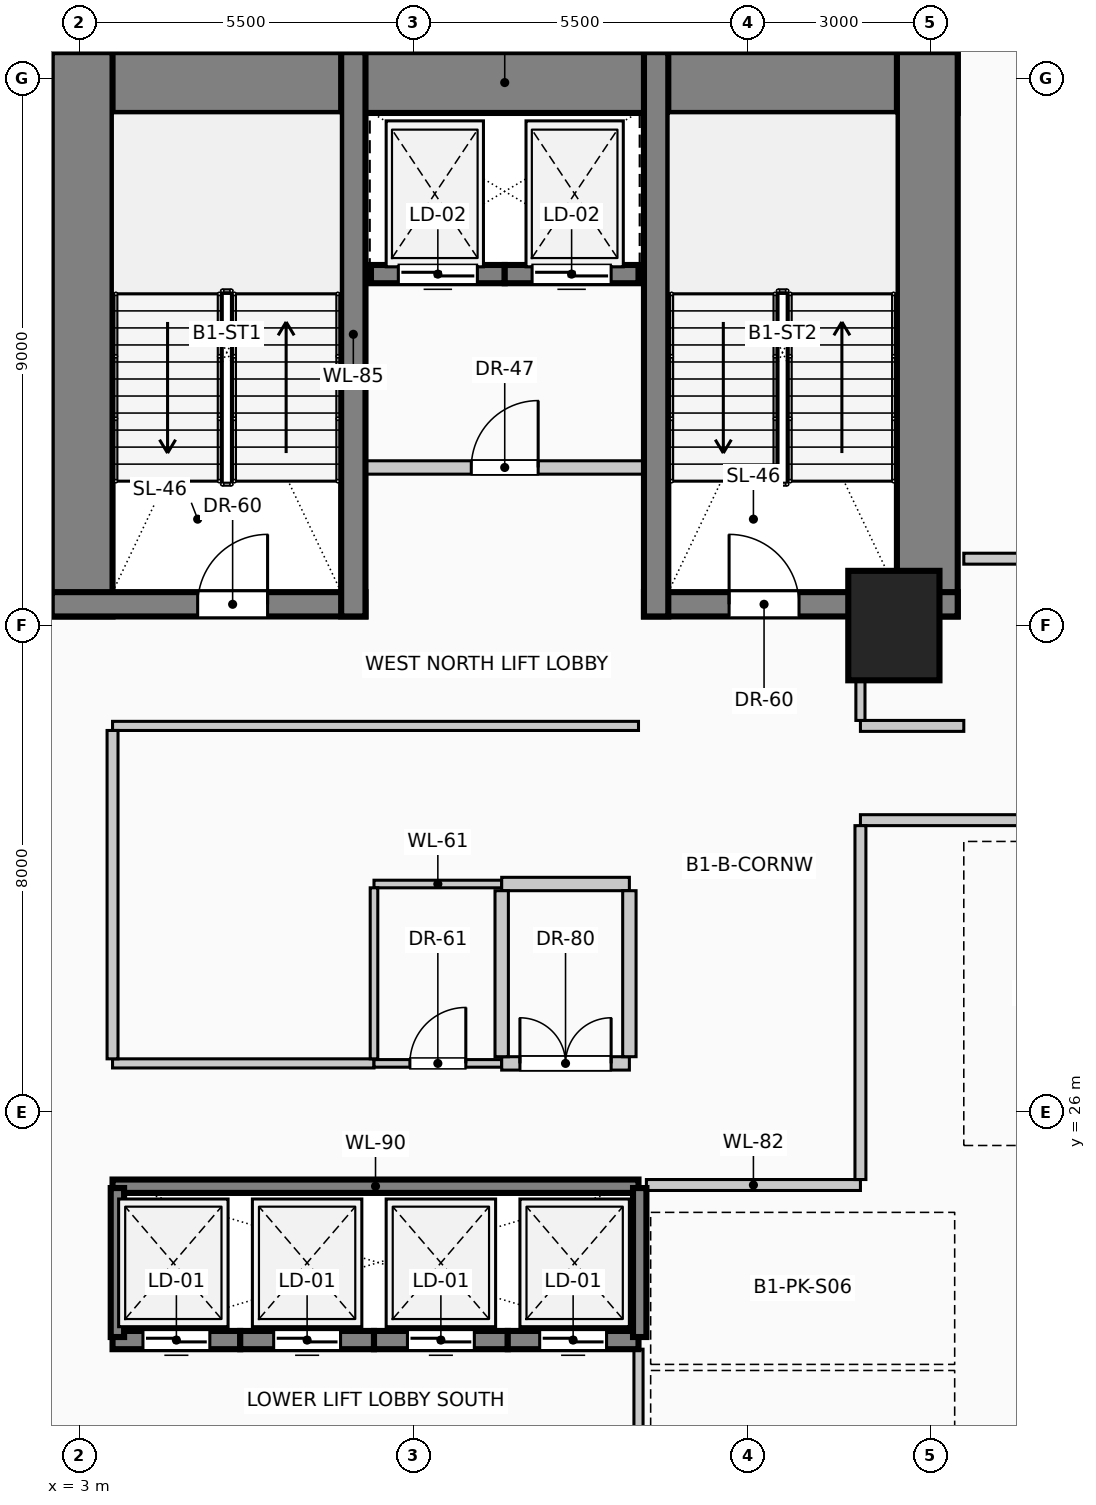
"""IFC4 building model, lengths in metres.
Left out: names, types, materials, properties, quantities, classifications, styles, units other than length and angle.
Written with IfcOpenShell. Run it as: python <this file> out.ifc"""

import sys

from ifc_helpers import new_model, si_unit, direction, frame, frame_2d, origin, origin_2d, place, context, subcontext, project, spatial, rectangle, extrude, element, fill, save


model = new_model("IFC4")
c1 = context("Model", 3, precision=1e-05, world=origin(), true_north=direction((0.0, 1.0)))
c2 = subcontext(c1, "Body", "Model", "MODEL_VIEW")
j1 = project(units=[si_unit("LENGTHUNIT", "METRE"), si_unit("PLANEANGLEUNIT", "RADIAN")], contexts=[c1])
p1 = place(None, origin())
s1 = spatial("IfcSite", under=j1, at=p1, CompositionType="ELEMENT")
p2 = place(p1, origin())
s2 = spatial("IfcBuilding", under=s1, at=p2, CompositionType="ELEMENT")
p3 = place(p2, frame((0.0, 0.0, -4.5)))
s3 = spatial("IfcBuildingStorey", under=s2, at=p3, CompositionType="ELEMENT", Elevation=-4.5)
p4 = place(p3, frame((2.55, 42.93, 0.0), z_axis=(0.0, 0.0, 1.0), x_axis=(1.0, 0.0, 0.0)))
e1 = element("IfcWall", 1, at=p4, inside=s3, PredefinedType="SHEAR", context=c2, shape_type="SweptSolid", body=[
    extrude(rectangle(XDim=14.9, YDim=1.0, at=frame_2d((7.45, 0.0))), origin(), (0.0, 0.0, 1.0), 4.5),
])
for number, where, z_axis, x_axis in (
    (2, (3.05, 34.15, 0.0), (0.0, 0.0, 1.0), (0.0, 1.0, 0.0)),
    (3, (16.95, 34.15, 0.0), (0.0, 0.0, 1.0), (0.0, 1.0, 0.0)),
):
    element("IfcWall", number, at=place(p3, frame(where, z_axis=z_axis, x_axis=x_axis)), inside=s3, PredefinedType="SHEAR", context=c2, shape_type="SweptSolid", body=[
        extrude(rectangle(XDim=9.28, YDim=1.0, at=frame_2d((4.64, 0.0))), origin(), (0.0, 0.0, 1.0), 4.5),
    ])
p5 = place(p3, frame((2.55, 34.35, 0.0), z_axis=(0.0, 0.0, 1.0), x_axis=(1.0, 0.0, 0.0)))
e4 = element("IfcWall", 4, at=p5, inside=s3, PredefinedType="SHEAR", context=c2, shape_type="SweptSolid", body=[
    extrude(rectangle(XDim=5.16, YDim=0.4, at=frame_2d((2.58, 0.0))), origin(), (0.0, 0.0, 1.0), 4.5),
])
p6 = place(p5, frame((2.4, 0.0, 0.0)))
e5 = element("IfcOpeningElement", 5, at=p6, cuts=e4, PredefinedType="OPENING", context=c2, shape_type="SweptSolid", body=[
    extrude(rectangle(XDim=1.15, YDim=2.2, at=frame_2d((0.575, 1.1))), frame((0.0, 0.21, 0.0), z_axis=(0.0, -1.0, 0.0), x_axis=(1.0, 0.0, 0.0)), (0.0, 0.0, 1.0), 0.42),
])
p7 = place(p3, frame((12.29, 34.35, 0.0), z_axis=(0.0, 0.0, 1.0), x_axis=(1.0, 0.0, 0.0)))
e6 = element("IfcWall", 6, at=p7, inside=s3, PredefinedType="SHEAR", context=c2, shape_type="SweptSolid", body=[
    extrude(rectangle(XDim=5.16, YDim=0.4, at=frame_2d((2.58, 0.0))), origin(), (0.0, 0.0, 1.0), 4.5),
])
p8 = place(p7, frame((1.4, 0.0, 0.0)))
e7 = element("IfcOpeningElement", 7, at=p8, cuts=e6, PredefinedType="OPENING", context=c2, shape_type="SweptSolid", body=[
    extrude(rectangle(XDim=1.15, YDim=2.2, at=frame_2d((0.575, 1.1))), frame((0.0, 0.21, 0.0), z_axis=(0.0, -1.0, 0.0), x_axis=(1.0, 0.0, 0.0)), (0.0, 0.0, 1.0), 0.42),
])
for number, where, z_axis, x_axis in (
    (8, (7.51, 34.15, 0.0), (0.0, 0.0, 1.0), (0.0, 1.0, 0.0)),
    (9, (12.49, 34.15, 0.0), (0.0, 0.0, 1.0), (0.0, 1.0, 0.0)),
):
    element("IfcWall", number, at=place(p3, frame(where, z_axis=z_axis, x_axis=x_axis)), inside=s3, PredefinedType="SHEAR", context=c2, shape_type="SweptSolid", body=[
        extrude(rectangle(XDim=9.28, YDim=0.4, at=frame_2d((4.64, 0.0))), origin(), (0.0, 0.0, 1.0), 4.5),
    ])
p9 = place(p3, frame((16.4, 34.0, 0.0), z_axis=(0.0, 0.0, 1.0), x_axis=(1.0, 0.0, 0.0)))
e10 = element("IfcColumn", 10, at=p9, inside=s3, PredefinedType="COLUMN", context=c2, shape_type="SweptSolid", body=[
    extrude(rectangle(XDim=1.5, YDim=1.8, at=origin_2d()), origin(), (0.0, 0.0, 1.0), 4.5),
])
p10 = place(p3, frame((5.65, 22.25, 0.0), z_axis=(0.0, 0.0, 1.0), x_axis=(-1.0, 0.0, 0.0)))
e11 = element("IfcWall", 11, at=p10, inside=s3, PredefinedType="SOLIDWALL", context=c2, shape_type="SweptSolid", body=[
    extrude(rectangle(XDim=2.1, YDim=0.3, at=frame_2d((1.05, 0.0))), origin(), (0.0, 0.0, 1.0), 4.5),
])
p11 = place(p10, frame((0.5, 0.0, 0.0)))
e12 = element("IfcOpeningElement", 12, at=p11, cuts=e11, PredefinedType="OPENING", context=c2, shape_type="SweptSolid", body=[
    extrude(rectangle(XDim=1.1, YDim=2.2, at=frame_2d((0.55, 1.1))), frame((0.0, 0.16, 0.0), z_axis=(0.0, -1.0, 0.0), x_axis=(1.0, 0.0, 0.0)), (0.0, 0.0, 1.0), 0.32),
])
p12 = place(p3, frame((7.85, 22.25, 0.0), z_axis=(0.0, 0.0, 1.0), x_axis=(-1.0, 0.0, 0.0)))
e13 = element("IfcWall", 13, at=p12, inside=s3, PredefinedType="SOLIDWALL", context=c2, shape_type="SweptSolid", body=[
    extrude(rectangle(XDim=2.2, YDim=0.3, at=frame_2d((1.1, 0.0))), origin(), (0.0, 0.0, 1.0), 4.5),
])
p13 = place(p12, frame((0.55, 0.0, 0.0)))
e14 = element("IfcOpeningElement", 14, at=p13, cuts=e13, PredefinedType="OPENING", context=c2, shape_type="SweptSolid", body=[
    extrude(rectangle(XDim=1.1, YDim=2.2, at=frame_2d((0.55, 1.1))), frame((0.0, 0.16, 0.0), z_axis=(0.0, -1.0, 0.0), x_axis=(1.0, 0.0, 0.0)), (0.0, 0.0, 1.0), 0.32),
])
p14 = place(p3, frame((10.05, 22.25, 0.0), z_axis=(0.0, 0.0, 1.0), x_axis=(-1.0, 0.0, 0.0)))
e15 = element("IfcWall", 15, at=p14, inside=s3, PredefinedType="SOLIDWALL", context=c2, shape_type="SweptSolid", body=[
    extrude(rectangle(XDim=2.2, YDim=0.3, at=frame_2d((1.1, 0.0))), origin(), (0.0, 0.0, 1.0), 4.5),
])
p15 = place(p14, frame((0.55, 0.0, 0.0)))
e16 = element("IfcOpeningElement", 16, at=p15, cuts=e15, PredefinedType="OPENING", context=c2, shape_type="SweptSolid", body=[
    extrude(rectangle(XDim=1.1, YDim=2.2, at=frame_2d((0.55, 1.1))), frame((0.0, 0.16, 0.0), z_axis=(0.0, -1.0, 0.0), x_axis=(1.0, 0.0, 0.0)), (0.0, 0.0, 1.0), 0.32),
])
p16 = place(p3, frame((12.2, 22.25, 0.0), z_axis=(0.0, 0.0, 1.0), x_axis=(-1.0, 0.0, 0.0)))
e17 = element("IfcWall", 17, at=p16, inside=s3, PredefinedType="SOLIDWALL", context=c2, shape_type="SweptSolid", body=[
    extrude(rectangle(XDim=2.15, YDim=0.3, at=frame_2d((1.075, 0.0))), origin(), (0.0, 0.0, 1.0), 4.5),
])
p17 = place(p16, frame((0.525, 0.0, 0.0)))
e18 = element("IfcOpeningElement", 18, at=p17, cuts=e17, PredefinedType="OPENING", context=c2, shape_type="SweptSolid", body=[
    extrude(rectangle(XDim=1.1, YDim=2.2, at=frame_2d((0.55, 1.1))), frame((0.0, 0.16, 0.0), z_axis=(0.0, -1.0, 0.0), x_axis=(1.0, 0.0, 0.0)), (0.0, 0.0, 1.0), 0.32),
])
p18 = place(p3, frame((10.0, 39.78, 0.0), z_axis=(0.0, 0.0, 1.0), x_axis=(-1.0, 0.0, 0.0)))
e19 = element("IfcWall", 19, at=p18, inside=s3, PredefinedType="SOLIDWALL", context=c2, shape_type="SweptSolid", body=[
    extrude(rectangle(XDim=2.2, YDim=0.3, at=frame_2d((1.1, 0.0))), origin(), (0.0, 0.0, 1.0), 4.5),
])
p19 = place(p18, frame((0.45, 0.0, 0.0)))
e20 = element("IfcOpeningElement", 20, at=p19, cuts=e19, PredefinedType="OPENING", context=c2, shape_type="SweptSolid", body=[
    extrude(rectangle(XDim=1.3, YDim=2.25, at=frame_2d((0.65, 1.125))), frame((0.0, 0.16, 0.0), z_axis=(0.0, -1.0, 0.0), x_axis=(1.0, 0.0, 0.0)), (0.0, 0.0, 1.0), 0.32),
])
p20 = place(p3, frame((12.2, 39.78, 0.0), z_axis=(0.0, 0.0, 1.0), x_axis=(-1.0, 0.0, 0.0)))
e21 = element("IfcWall", 21, at=p20, inside=s3, PredefinedType="SOLIDWALL", context=c2, shape_type="SweptSolid", body=[
    extrude(rectangle(XDim=2.2, YDim=0.3, at=frame_2d((1.1, 0.0))), origin(), (0.0, 0.0, 1.0), 4.5),
])
p21 = place(p20, frame((0.45, 0.0, 0.0)))
e22 = element("IfcOpeningElement", 22, at=p21, cuts=e21, PredefinedType="OPENING", context=c2, shape_type="SweptSolid", body=[
    extrude(rectangle(XDim=1.3, YDim=2.25, at=frame_2d((0.65, 1.125))), frame((0.0, 0.16, 0.0), z_axis=(0.0, -1.0, 0.0), x_axis=(1.0, 0.0, 0.0)), (0.0, 0.0, 1.0), 0.32),
])
p22 = place(p3, frame((3.55, 24.78, 0.0), z_axis=(0.0, 0.0, 1.0), x_axis=(1.0, 0.0, 0.0)))
e23 = element("IfcWall", 23, at=p22, inside=s3, PredefinedType="SOLIDWALL", context=c2, shape_type="SweptSolid", body=[
    extrude(rectangle(XDim=8.65, YDim=0.22, at=frame_2d((4.325, 0.0))), origin(), (0.0, 0.0, 1.0), 4.5),
])
for number, where, z_axis, x_axis in (
    (24, (3.63, 22.3, 0.0), (0.0, 0.0, 1.0), (0.0, 1.0, 0.0)),
    (25, (12.22, 22.3, 0.0), (0.0, 0.0, 1.0), (0.0, 1.0, 0.0)),
):
    element("IfcWall", number, at=place(p3, frame(where, z_axis=z_axis, x_axis=x_axis)), inside=s3, PredefinedType="SOLIDWALL", context=c2, shape_type="SweptSolid", body=[
        extrude(rectangle(XDim=2.45, YDim=0.22, at=frame_2d((1.225, 0.0))), origin(), (0.0, 0.0, 1.0), 4.5),
    ])
p23 = place(p3, frame((7.51, 36.6, 0.0), z_axis=(0.0, 0.0, 1.0), x_axis=(1.0, 0.0, 0.0)))
e26 = element("IfcWall", 26, at=p23, inside=s3, PredefinedType="PARTITIONING", context=c2, shape_type="SweptSolid", body=[
    extrude(rectangle(XDim=4.98, YDim=0.22, at=frame_2d((2.49, 0.0))), origin(), (0.0, 0.0, 1.0), 4.1),
])
p24 = place(p23, frame((1.94, 0.0, 0.0)))
e27 = element("IfcOpeningElement", 27, at=p24, cuts=e26, PredefinedType="OPENING", context=c2, shape_type="SweptSolid", body=[
    extrude(rectangle(XDim=1.1, YDim=2.2, at=frame_2d((0.55, 1.1))), frame((0.0, 0.12, 0.0), z_axis=(0.0, -1.0, 0.0), x_axis=(1.0, 0.0, 0.0)), (0.0, 0.0, 1.0), 0.24),
])
p25 = place(p3, frame((12.33, 24.8, 0.0), z_axis=(0.0, 0.0, 1.0), x_axis=(1.0, 0.0, 0.0)))
e28 = element("IfcWall", 28, at=p25, inside=s3, PredefinedType="PARTITIONING", context=c2, shape_type="SweptSolid", body=[
    extrude(rectangle(XDim=3.52, YDim=0.18, at=frame_2d((1.76, 0.0))), origin(), (0.0, 0.0, 1.0), 4.1),
])
p26 = place(p3, frame((3.55, 26.8, 0.0), z_axis=(0.0, 0.0, 1.0), x_axis=(1.0, 0.0, 0.0)))
e29 = element("IfcWall", 29, at=p26, inside=s3, PredefinedType="PARTITIONING", context=c2, shape_type="SweptSolid", body=[
    extrude(rectangle(XDim=4.3, YDim=0.15, at=frame_2d((2.15, 0.0))), origin(), (0.0, 0.0, 1.0), 4.1),
])
p27 = place(p3, frame((7.85, 26.8, 0.0), z_axis=(0.0, 0.0, 1.0), x_axis=(1.0, 0.0, 0.0)))
e30 = element("IfcWall", 30, at=p27, inside=s3, PredefinedType="PARTITIONING", context=c2, shape_type="SweptSolid", body=[
    extrude(rectangle(XDim=2.1, YDim=0.125, at=frame_2d((1.05, 0.0))), origin(), (0.0, 0.0, 1.0), 4.1),
])
p28 = place(p27, frame((0.59, 0.0, 0.0)))
e31 = element("IfcOpeningElement", 31, at=p28, cuts=e30, PredefinedType="OPENING", context=c2, shape_type="SweptSolid", body=[
    extrude(rectangle(XDim=0.92, YDim=2.1, at=frame_2d((0.46, 1.05))), frame((0.0, 0.073, 0.0), z_axis=(0.0, -1.0, 0.0), x_axis=(1.0, 0.0, 0.0)), (0.0, 0.0, 1.0), 0.145),
])
p29 = place(p3, frame((9.95, 26.8, 0.0), z_axis=(0.0, 0.0, 1.0), x_axis=(1.0, 0.0, 0.0)))
e32 = element("IfcWall", 32, at=p29, inside=s3, PredefinedType="PARTITIONING", context=c2, shape_type="SweptSolid", body=[
    extrude(rectangle(XDim=2.1, YDim=0.22, at=frame_2d((1.05, 0.0))), origin(), (0.0, 0.0, 1.0), 4.1),
])
p30 = place(p29, frame((0.3, 0.0, 0.0)))
e33 = element("IfcOpeningElement", 33, at=p30, cuts=e32, PredefinedType="OPENING", context=c2, shape_type="SweptSolid", body=[
    extrude(rectangle(XDim=1.5, YDim=2.25, at=frame_2d((0.75, 1.125))), frame((0.0, 0.12, 0.0), z_axis=(0.0, -1.0, 0.0), x_axis=(1.0, 0.0, 0.0)), (0.0, 0.0, 1.0), 0.24),
])
p31 = place(p3, frame((7.85, 29.75, 0.0), z_axis=(0.0, 0.0, 1.0), x_axis=(1.0, 0.0, 0.0)))
e34 = element("IfcWall", 34, at=p31, inside=s3, PredefinedType="PARTITIONING", context=c2, shape_type="SweptSolid", body=[
    extrude(rectangle(XDim=2.1, YDim=0.125, at=frame_2d((1.05, 0.0))), origin(), (0.0, 0.0, 1.0), 4.1),
])
p32 = place(p3, frame((9.95, 29.75, 0.0), z_axis=(0.0, 0.0, 1.0), x_axis=(1.0, 0.0, 0.0)))
e35 = element("IfcWall", 35, at=p32, inside=s3, PredefinedType="PARTITIONING", context=c2, shape_type="SweptSolid", body=[
    extrude(rectangle(XDim=2.1, YDim=0.22, at=frame_2d((1.05, 0.0))), origin(), (0.0, 0.0, 1.0), 4.1),
])
p33 = place(p3, frame((15.85, 30.8, 0.0), z_axis=(0.0, 0.0, 1.0), x_axis=(1.0, 0.0, 0.0)))
e36 = element("IfcWall", 36, at=p33, inside=s3, PredefinedType="PARTITIONING", context=c2, shape_type="SweptSolid", body=[
    extrude(rectangle(XDim=29.7, YDim=0.18, at=frame_2d((14.85, 0.0))), origin(), (0.0, 0.0, 1.0), 4.1),
])
p34 = place(p3, frame((3.55, 32.35, 0.0), z_axis=(0.0, 0.0, 1.0), x_axis=(1.0, 0.0, 0.0)))
e37 = element("IfcWall", 37, at=p34, inside=s3, PredefinedType="PARTITIONING", context=c2, shape_type="SweptSolid", body=[
    extrude(rectangle(XDim=8.65, YDim=0.15, at=frame_2d((4.325, 0.0))), origin(), (0.0, 0.0, 1.0), 4.1),
])
p35 = place(p3, frame((15.85, 32.35, 0.0), z_axis=(0.0, 0.0, 1.0), x_axis=(1.0, 0.0, 0.0)))
e38 = element("IfcWall", 38, at=p35, inside=s3, PredefinedType="PARTITIONING", context=c2, shape_type="SweptSolid", body=[
    extrude(rectangle(XDim=1.7, YDim=0.18, at=frame_2d((0.85, 0.0))), origin(), (0.0, 0.0, 1.0), 4.1),
])
p36 = place(p3, frame((1.85, 34.35, 0.0), z_axis=(0.0, 0.0, 1.0), x_axis=(1.0, 0.0, 0.0)))
e39 = element("IfcWall", 39, at=p36, inside=s3, PredefinedType="PARTITIONING", context=c2, shape_type="SweptSolid", body=[
    extrude(rectangle(XDim=0.7, YDim=0.18, at=frame_2d((0.35, 0.0))), origin(), (0.0, 0.0, 1.0), 3.145),
])
p37 = place(p3, frame((17.55, 35.1, 0.0), z_axis=(0.0, 0.0, 1.0), x_axis=(1.0, 0.0, 0.0)))
e40 = element("IfcWall", 40, at=p37, inside=s3, PredefinedType="PARTITIONING", context=c2, shape_type="SweptSolid", body=[
    extrude(rectangle(XDim=10.25, YDim=0.18, at=frame_2d((5.125, 0.0))), origin(), (0.0, 0.0, 1.0), 4.1),
])
p38 = place(p37, frame((4.685, 0.0, 0.0)))
e41 = element("IfcOpeningElement", 41, at=p38, cuts=e40, PredefinedType="OPENING", context=c2, shape_type="SweptSolid", body=[
    extrude(rectangle(XDim=0.88, YDim=2.1, at=frame_2d((0.44, 1.05))), frame((0.0, 0.1, 0.0), z_axis=(0.0, -1.0, 0.0), x_axis=(1.0, 0.0, 0.0)), (0.0, 0.0, 1.0), 0.2),
])
p39 = place(p3, frame((3.55, 26.875, 0.0), z_axis=(0.0, 0.0, 1.0), x_axis=(0.0, 1.0, 0.0)))
e42 = element("IfcWall", 42, at=p39, inside=s3, PredefinedType="PARTITIONING", context=c2, shape_type="SweptSolid", body=[
    extrude(rectangle(XDim=5.4, YDim=0.18, at=frame_2d((2.7, 0.0))), origin(), (0.0, 0.0, 1.0), 4.1),
])
p40 = place(p3, frame((7.85, 26.875, 0.0), z_axis=(0.0, 0.0, 1.0), x_axis=(0.0, 1.0, 0.0)))
e43 = element("IfcWall", 43, at=p40, inside=s3, PredefinedType="PARTITIONING", context=c2, shape_type="SweptSolid", body=[
    extrude(rectangle(XDim=2.812, YDim=0.125, at=frame_2d((1.406, 0.0))), origin(), (0.0, 0.0, 1.0), 4.1),
])
for number, where, z_axis, x_axis in (
    (44, (9.95, 26.91, 0.0), (0.0, 0.0, 1.0), (0.0, 1.0, 0.0)),
    (45, (12.05, 26.91, 0.0), (0.0, 0.0, 1.0), (0.0, 1.0, 0.0)),
):
    element("IfcWall", number, at=place(p3, frame(where, z_axis=z_axis, x_axis=x_axis)), inside=s3, PredefinedType="PARTITIONING", context=c2, shape_type="SweptSolid", body=[
        extrude(rectangle(XDim=2.73, YDim=0.22, at=frame_2d((1.365, 0.0))), origin(), (0.0, 0.0, 1.0), 4.1),
    ])
p41 = place(p3, frame((12.2, 20.275, 0.0), z_axis=(0.0, 0.0, 1.0), x_axis=(0.0, 1.0, 0.0)))
e46 = element("IfcWall", 46, at=p41, inside=s3, PredefinedType="PARTITIONING", context=c2, shape_type="SweptSolid", body=[
    extrude(rectangle(XDim=1.825, YDim=0.15, at=frame_2d((0.913, 0.0))), origin(), (0.0, 0.0, 1.0), 4.1),
])
p42 = place(p3, frame((15.85, 24.89, 0.0), z_axis=(0.0, 0.0, 1.0), x_axis=(0.0, 1.0, 0.0)))
e47 = element("IfcWall", 47, at=p42, inside=s3, PredefinedType="PARTITIONING", context=c2, shape_type="SweptSolid", body=[
    extrude(rectangle(XDim=5.82, YDim=0.18, at=frame_2d((2.91, 0.0))), origin(), (0.0, 0.0, 1.0), 4.1),
])
p43 = place(p3, frame((15.85, 32.44, 0.0), z_axis=(0.0, 0.0, 1.0), x_axis=(0.0, 1.0, 0.0)))
e48 = element("IfcWall", 48, at=p43, inside=s3, PredefinedType="PARTITIONING", context=c2, shape_type="SweptSolid", body=[
    extrude(rectangle(XDim=0.66, YDim=0.15, at=frame_2d((0.33, 0.0))), origin(), (0.0, 0.0, 1.0), 4.1),
])
p44 = place(p11, origin())
e49 = element("IfcDoor", 49, at=p44, inside=s3, OperationType="SLIDING_TO_LEFT", PredefinedType="DOOR", context=c2, shape_type="SweptSolid", body=[
    extrude(rectangle(XDim=1.1, YDim=2.2, at=frame_2d((0.55, 1.1))), frame((0.0, 0.025, 0.0), z_axis=(0.0, -1.0, 0.0), x_axis=(1.0, 0.0, 0.0)), (0.0, 0.0, 1.0), 0.05),
])
fill(e12, e49)
p45 = place(p13, origin())
e50 = element("IfcDoor", 50, at=p45, inside=s3, OperationType="SLIDING_TO_RIGHT", PredefinedType="DOOR", context=c2, shape_type="SweptSolid", body=[
    extrude(rectangle(XDim=1.1, YDim=2.2, at=frame_2d((0.55, 1.1))), frame((0.0, 0.025, 0.0), z_axis=(0.0, -1.0, 0.0), x_axis=(1.0, 0.0, 0.0)), (0.0, 0.0, 1.0), 0.05),
])
fill(e14, e50)
p46 = place(p15, origin())
e51 = element("IfcDoor", 51, at=p46, inside=s3, OperationType="SLIDING_TO_LEFT", PredefinedType="DOOR", context=c2, shape_type="SweptSolid", body=[
    extrude(rectangle(XDim=1.1, YDim=2.2, at=frame_2d((0.55, 1.1))), frame((0.0, 0.025, 0.0), z_axis=(0.0, -1.0, 0.0), x_axis=(1.0, 0.0, 0.0)), (0.0, 0.0, 1.0), 0.05),
])
fill(e16, e51)
p47 = place(p17, origin())
e52 = element("IfcDoor", 52, at=p47, inside=s3, OperationType="SLIDING_TO_RIGHT", PredefinedType="DOOR", context=c2, shape_type="SweptSolid", body=[
    extrude(rectangle(XDim=1.1, YDim=2.2, at=frame_2d((0.55, 1.1))), frame((0.0, 0.025, 0.0), z_axis=(0.0, -1.0, 0.0), x_axis=(1.0, 0.0, 0.0)), (0.0, 0.0, 1.0), 0.05),
])
fill(e18, e52)
p48 = place(p19, origin())
e53 = element("IfcDoor", 53, at=p48, inside=s3, OperationType="SLIDING_TO_LEFT", PredefinedType="DOOR", context=c2, shape_type="SweptSolid", body=[
    extrude(rectangle(XDim=1.3, YDim=2.25, at=frame_2d((0.65, 1.125))), frame((0.0, 0.025, 0.0), z_axis=(0.0, -1.0, 0.0), x_axis=(1.0, 0.0, 0.0)), (0.0, 0.0, 1.0), 0.05),
])
fill(e20, e53)
p49 = place(p21, origin())
e54 = element("IfcDoor", 54, at=p49, inside=s3, OperationType="SLIDING_TO_RIGHT", PredefinedType="DOOR", context=c2, shape_type="SweptSolid", body=[
    extrude(rectangle(XDim=1.3, YDim=2.25, at=frame_2d((0.65, 1.125))), frame((0.0, 0.025, 0.0), z_axis=(0.0, -1.0, 0.0), x_axis=(1.0, 0.0, 0.0)), (0.0, 0.0, 1.0), 0.05),
])
fill(e22, e54)
p50 = place(p6, origin())
e55 = element("IfcDoor", 55, at=p50, inside=s3, OperationType="SINGLE_SWING_RIGHT", PredefinedType="DOOR", context=c2, shape_type="SweptSolid", body=[
    extrude(rectangle(XDim=1.15, YDim=2.2, at=frame_2d((0.575, 1.1))), frame((0.0, 0.025, 0.0), z_axis=(0.0, -1.0, 0.0), x_axis=(1.0, 0.0, 0.0)), (0.0, 0.0, 1.0), 0.05),
])
fill(e5, e55)
p51 = place(p8, origin())
e56 = element("IfcDoor", 56, at=p51, inside=s3, OperationType="SINGLE_SWING_LEFT", PredefinedType="DOOR", context=c2, shape_type="SweptSolid", body=[
    extrude(rectangle(XDim=1.15, YDim=2.2, at=frame_2d((0.575, 1.1))), frame((0.0, 0.025, 0.0), z_axis=(0.0, -1.0, 0.0), x_axis=(1.0, 0.0, 0.0)), (0.0, 0.0, 1.0), 0.05),
])
fill(e7, e56)
p52 = place(p24, origin())
e57 = element("IfcDoor", 57, at=p52, inside=s3, OperationType="SINGLE_SWING_RIGHT", PredefinedType="DOOR", context=c2, shape_type="SweptSolid", body=[
    extrude(rectangle(XDim=1.1, YDim=2.2, at=frame_2d((0.55, 1.1))), frame((0.0, 0.025, 0.0), z_axis=(0.0, -1.0, 0.0), x_axis=(1.0, 0.0, 0.0)), (0.0, 0.0, 1.0), 0.05),
])
fill(e27, e57)
p53 = place(p28, origin())
e58 = element("IfcDoor", 58, at=p53, inside=s3, OperationType="SINGLE_SWING_RIGHT", PredefinedType="DOOR", context=c2, shape_type="SweptSolid", body=[
    extrude(rectangle(XDim=0.92, YDim=2.1, at=frame_2d((0.46, 1.05))), frame((0.0, 0.025, 0.0), z_axis=(0.0, -1.0, 0.0), x_axis=(1.0, 0.0, 0.0)), (0.0, 0.0, 1.0), 0.05),
])
fill(e31, e58)
p54 = place(p30, origin())
e59 = element("IfcDoor", 59, at=p54, inside=s3, OperationType="DOUBLE_DOOR_SINGLE_SWING", PredefinedType="DOOR", context=c2, shape_type="SweptSolid", body=[
    extrude(rectangle(XDim=1.5, YDim=2.25, at=frame_2d((0.75, 1.125))), frame((0.0, 0.025, 0.0), z_axis=(0.0, -1.0, 0.0), x_axis=(1.0, 0.0, 0.0)), (0.0, 0.0, 1.0), 0.05),
])
fill(e33, e59)
save(model, sys.argv[1])
